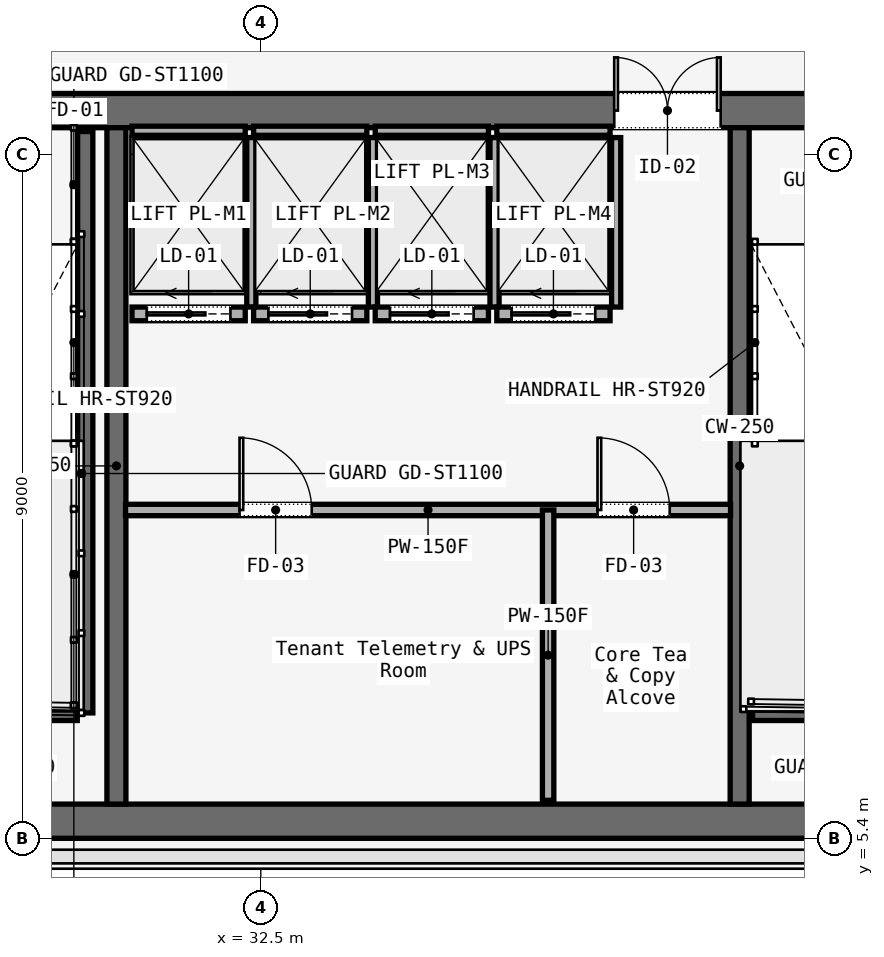
"""IFC4 building model, lengths in metres.
Left out: names, types, materials, properties, quantities, classifications, styles, units other than length and angle.
Written with IfcOpenShell. Run it as: python <this file> out.ifc"""

import sys

from ifc_helpers import new_model, si_unit, direction, frame, frame_2d, origin, place, context, subcontext, project, spatial, rectangle, extrude, element, fill, save


model = new_model("IFC4")
c1 = context("Model", 3, precision=1e-05, world=origin(), true_north=direction((0.0, 1.0)))
c2 = subcontext(c1, "Body", "Model", "MODEL_VIEW")
j1 = project(units=[si_unit("LENGTHUNIT", "METRE"), si_unit("PLANEANGLEUNIT", "RADIAN")], contexts=[c1])
p1 = place(None, origin())
s1 = spatial("IfcSite", under=j1, at=p1, CompositionType="ELEMENT")
p2 = place(p1, origin())
s2 = spatial("IfcBuilding", under=s1, at=p2, CompositionType="ELEMENT")
p3 = place(p2, frame((0.0, 0.0, 134.6)))
s3 = spatial("IfcBuildingStorey", under=s2, at=p3, CompositionType="ELEMENT", Elevation=134.6)
p4 = place(p3, frame((26.45, 14.975, 0.0), z_axis=(0.0, 0.0, 1.0), x_axis=(1.0, 0.0, 0.0)))
e1 = element("IfcWall", 1, at=p4, inside=s3, PredefinedType="SOLIDWALL", context=c2, shape_type="SweptSolid", body=[
    extrude(rectangle(XDim=31.1, YDim=0.45, at=frame_2d((15.55, 0.0))), origin(), (0.0, 0.0, 1.0), 3.58),
])
p5 = place(p4, frame((1.65, 0.0, 0.0)))
e2 = element("IfcOpeningElement", 2, at=p5, cuts=e1, PredefinedType="OPENING", context=c2, shape_type="SweptSolid", body=[
    extrude(rectangle(XDim=1.1, YDim=2.2, at=frame_2d((0.55, 1.1))), frame((0.0, 0.225, 0.0), z_axis=(0.0, -1.0, 0.0), x_axis=(1.0, 0.0, 0.0)), (0.0, 0.0, 1.0), 0.45),
])
p6 = place(p4, frame((13.65, 0.0, 0.0)))
e3 = element("IfcOpeningElement", 3, at=p6, cuts=e1, PredefinedType="OPENING", context=c2, shape_type="SweptSolid", body=[
    extrude(rectangle(XDim=1.1, YDim=2.2, at=frame_2d((0.55, 1.1))), frame((0.0, 0.225, 0.0), z_axis=(0.0, -1.0, 0.0), x_axis=(1.0, 0.0, 0.0)), (0.0, 0.0, 1.0), 0.45),
])
p7 = place(p4, frame((25.55, 0.0, 0.0)))
e4 = element("IfcOpeningElement", 4, at=p7, cuts=e1, PredefinedType="OPENING", context=c2, shape_type="SweptSolid", body=[
    extrude(rectangle(XDim=1.1, YDim=2.2, at=frame_2d((0.55, 1.1))), frame((0.0, 0.225, 0.0), z_axis=(0.0, -1.0, 0.0), x_axis=(1.0, 0.0, 0.0)), (0.0, 0.0, 1.0), 0.45),
])
p8 = place(p4, frame((10.7, 0.0, 0.0)))
e5 = element("IfcOpeningElement", 5, at=p8, cuts=e1, PredefinedType="OPENING", context=c2, shape_type="SweptSolid", body=[
    extrude(rectangle(XDim=1.4, YDim=2.2, at=frame_2d((0.7, 1.1))), frame((0.0, 0.225, 0.0), z_axis=(0.0, -1.0, 0.0), x_axis=(1.0, 0.0, 0.0)), (0.0, 0.0, 1.0), 0.45),
])
p9 = place(p4, frame((19.35, 0.0, 0.0)))
e6 = element("IfcOpeningElement", 6, at=p9, cuts=e1, PredefinedType="OPENING", context=c2, shape_type="SweptSolid", body=[
    extrude(rectangle(XDim=1.1, YDim=2.2, at=frame_2d((0.55, 1.1))), frame((0.0, 0.225, 0.0), z_axis=(0.0, -1.0, 0.0), x_axis=(1.0, 0.0, 0.0)), (0.0, 0.0, 1.0), 0.45),
])
p10 = place(p4, frame((21.4, 0.0, 0.0)))
e7 = element("IfcOpeningElement", 7, at=p10, cuts=e1, PredefinedType="OPENING", context=c2, shape_type="SweptSolid", body=[
    extrude(rectangle(XDim=0.9, YDim=2.1, at=frame_2d((0.45, 1.05))), frame((0.0, 0.225, 0.0), z_axis=(0.0, -1.0, 0.0), x_axis=(1.0, 0.0, 0.0)), (0.0, 0.0, 1.0), 0.45),
])
p11 = place(p4, frame((23.35, 0.0, 0.0)))
e8 = element("IfcOpeningElement", 8, at=p11, cuts=e1, PredefinedType="OPENING", context=c2, shape_type="SweptSolid", body=[
    extrude(rectangle(XDim=1.3, YDim=2.3, at=frame_2d((0.65, 1.15))), frame((0.0, 0.225, 0.0), z_axis=(0.0, -1.0, 0.0), x_axis=(1.0, 0.0, 0.0)), (0.0, 0.0, 1.0), 0.45),
])
p12 = place(p3, frame((26.45, 5.625, 0.0), z_axis=(0.0, 0.0, 1.0), x_axis=(1.0, 0.0, 0.0)))
e9 = element("IfcWall", 9, at=p12, inside=s3, PredefinedType="SOLIDWALL", context=c2, shape_type="SweptSolid", body=[
    extrude(rectangle(XDim=31.1, YDim=0.45, at=frame_2d((15.55, 0.0))), origin(), (0.0, 0.0, 1.0), 3.58),
])
for number, where, z_axis, x_axis in (
    (10, (30.6, 5.85, 0.0), (0.0, 0.0, 1.0), (0.0, 1.0, 0.0)),
    (11, (38.8, 5.85, 0.0), (0.0, 0.0, 1.0), (0.0, 1.0, 0.0)),
):
    element("IfcWall", number, at=place(p3, frame(where, z_axis=z_axis, x_axis=x_axis)), inside=s3, PredefinedType="SOLIDWALL", context=c2, shape_type="SweptSolid", body=[
        extrude(rectangle(XDim=8.9, YDim=0.25, at=frame_2d((4.45, 0.0))), origin(), (0.0, 0.0, 1.0), 3.58),
    ])
p13 = place(p3, frame((30.19, 14.7, 0.0), z_axis=(0.0, 0.0, 1.0), x_axis=(0.0, -1.0, 0.0)))
e12 = element("IfcWall", 12, at=p13, inside=s3, PredefinedType="SOLIDWALL", context=c2, shape_type="SweptSolid", body=[
    extrude(rectangle(XDim=7.65, YDim=0.2, at=frame_2d((3.825, 0.0))), origin(), (0.0, 0.0, 1.0), 3.8),
])
for number, where, z_axis, x_axis in (
    (13, (26.97, 7.05, 0.0), (0.0, 0.0, 1.0), (1.0, 0.0, 0.0)),
    (14, (38.97, 7.05, 0.0), (0.0, 0.0, 1.0), (1.0, 0.0, 0.0)),
):
    element("IfcWall", number, at=place(p3, frame(where, z_axis=z_axis, x_axis=x_axis)), inside=s3, PredefinedType="SOLIDWALL", context=c2, shape_type="SweptSolid", body=[
        extrude(rectangle(XDim=3.115, YDim=0.2, at=frame_2d((1.558, 0.0))), origin(), (0.0, 0.0, 1.0), 3.8),
    ])
p14 = place(p3, frame((30.72, 9.72, 0.0), z_axis=(0.0, 0.0, 1.0), x_axis=(1.0, 0.0, 0.0)))
e15 = element("IfcWall", 15, at=p14, inside=s3, PredefinedType="PARTITIONING", context=c2, shape_type="SweptSolid", body=[
    extrude(rectangle(XDim=7.96, YDim=0.15, at=frame_2d((3.98, 0.0))), origin(), (0.0, 0.0, 1.0), 3.01),
])
p15 = place(p14, frame((1.5, 0.0, 0.0)))
e16 = element("IfcOpeningElement", 16, at=p15, cuts=e15, PredefinedType="OPENING", context=c2, shape_type="SweptSolid", body=[
    extrude(rectangle(XDim=0.95, YDim=2.2, at=frame_2d((0.475, 1.1))), frame((0.0, 0.075, 0.0), z_axis=(0.0, -1.0, 0.0), x_axis=(1.0, 0.0, 0.0)), (0.0, 0.0, 1.0), 0.15),
])
p16 = place(p14, frame((6.21, 0.0, 0.0)))
e17 = element("IfcOpeningElement", 17, at=p16, cuts=e15, PredefinedType="OPENING", context=c2, shape_type="SweptSolid", body=[
    extrude(rectangle(XDim=0.95, YDim=2.2, at=frame_2d((0.475, 1.1))), frame((0.0, 0.075, 0.0), z_axis=(0.0, -1.0, 0.0), x_axis=(1.0, 0.0, 0.0)), (0.0, 0.0, 1.0), 0.15),
])
p17 = place(p3, frame((36.28, 5.9, 0.0), z_axis=(0.0, 0.0, 1.0), x_axis=(0.0, 1.0, 0.0)))
e18 = element("IfcWall", 18, at=p17, inside=s3, PredefinedType="PARTITIONING", context=c2, shape_type="SweptSolid", body=[
    extrude(rectangle(XDim=3.82, YDim=0.15, at=frame_2d((1.91, 0.0))), origin(), (0.0, 0.0, 1.0), 3.01),
])
p18 = place(p3, frame((30.805, 12.3, 0.0), z_axis=(0.0, 0.0, 1.0), x_axis=(1.0, 0.0, 0.0)))
e19 = element("IfcWall", 19, at=p18, inside=s3, PredefinedType="SOLIDWALL", context=c2, shape_type="SweptSolid", body=[
    extrude(rectangle(XDim=1.49, YDim=0.18, at=frame_2d((0.745, 0.0))), origin(), (0.0, 0.0, 1.0), 3.01),
])
p19 = place(p18, frame((0.195, 0.0, 0.0)))
e20 = element("IfcOpeningElement", 20, at=p19, cuts=e19, PredefinedType="OPENING", context=c2, shape_type="SweptSolid", body=[
    extrude(rectangle(XDim=1.1, YDim=2.2, at=frame_2d((0.55, 1.1))), frame((0.0, 0.09, 0.0), z_axis=(0.0, -1.0, 0.0), x_axis=(1.0, 0.0, 0.0)), (0.0, 0.0, 1.0), 0.18),
])
p20 = place(p3, frame((30.805, 14.71, 0.0), z_axis=(0.0, 0.0, 1.0), x_axis=(1.0, 0.0, 0.0)))
e21 = element("IfcWall", 21, at=p20, inside=s3, PredefinedType="SOLIDWALL", context=c2, shape_type="SweptSolid", body=[
    extrude(rectangle(XDim=1.49, YDim=0.12, at=frame_2d((0.745, 0.0))), origin(), (0.0, 0.0, 1.0), 3.01),
])
p21 = place(p3, frame((32.375, 12.39, 0.0), z_axis=(0.0, 0.0, 1.0), x_axis=(0.0, 1.0, 0.0)))
e22 = element("IfcWall", 22, at=p21, inside=s3, PredefinedType="SOLIDWALL", context=c2, shape_type="SweptSolid", body=[
    extrude(rectangle(XDim=2.23, YDim=0.12, at=frame_2d((1.115, 0.0))), origin(), (0.0, 0.0, 1.0), 3.01),
])
p22 = place(p3, frame((32.405, 12.3, 0.0), z_axis=(0.0, 0.0, 1.0), x_axis=(1.0, 0.0, 0.0)))
e23 = element("IfcWall", 23, at=p22, inside=s3, PredefinedType="SOLIDWALL", context=c2, shape_type="SweptSolid", body=[
    extrude(rectangle(XDim=1.49, YDim=0.18, at=frame_2d((0.745, 0.0))), origin(), (0.0, 0.0, 1.0), 3.01),
])
p23 = place(p22, frame((0.195, 0.0, 0.0)))
e24 = element("IfcOpeningElement", 24, at=p23, cuts=e23, PredefinedType="OPENING", context=c2, shape_type="SweptSolid", body=[
    extrude(rectangle(XDim=1.1, YDim=2.2, at=frame_2d((0.55, 1.1))), frame((0.0, 0.09, 0.0), z_axis=(0.0, -1.0, 0.0), x_axis=(1.0, 0.0, 0.0)), (0.0, 0.0, 1.0), 0.18),
])
p24 = place(p3, frame((32.405, 14.71, 0.0), z_axis=(0.0, 0.0, 1.0), x_axis=(1.0, 0.0, 0.0)))
e25 = element("IfcWall", 25, at=p24, inside=s3, PredefinedType="SOLIDWALL", context=c2, shape_type="SweptSolid", body=[
    extrude(rectangle(XDim=1.49, YDim=0.12, at=frame_2d((0.745, 0.0))), origin(), (0.0, 0.0, 1.0), 3.01),
])
p25 = place(p3, frame((33.975, 12.39, 0.0), z_axis=(0.0, 0.0, 1.0), x_axis=(0.0, 1.0, 0.0)))
e26 = element("IfcWall", 26, at=p25, inside=s3, PredefinedType="SOLIDWALL", context=c2, shape_type="SweptSolid", body=[
    extrude(rectangle(XDim=2.23, YDim=0.12, at=frame_2d((1.115, 0.0))), origin(), (0.0, 0.0, 1.0), 3.01),
])
p26 = place(p3, frame((34.005, 12.3, 0.0), z_axis=(0.0, 0.0, 1.0), x_axis=(1.0, 0.0, 0.0)))
e27 = element("IfcWall", 27, at=p26, inside=s3, PredefinedType="SOLIDWALL", context=c2, shape_type="SweptSolid", body=[
    extrude(rectangle(XDim=1.49, YDim=0.18, at=frame_2d((0.745, 0.0))), origin(), (0.0, 0.0, 1.0), 3.01),
])
p27 = place(p26, frame((0.195, 0.0, 0.0)))
e28 = element("IfcOpeningElement", 28, at=p27, cuts=e27, PredefinedType="OPENING", context=c2, shape_type="SweptSolid", body=[
    extrude(rectangle(XDim=1.1, YDim=2.2, at=frame_2d((0.55, 1.1))), frame((0.0, 0.09, 0.0), z_axis=(0.0, -1.0, 0.0), x_axis=(1.0, 0.0, 0.0)), (0.0, 0.0, 1.0), 0.18),
])
p28 = place(p3, frame((34.005, 14.71, 0.0), z_axis=(0.0, 0.0, 1.0), x_axis=(1.0, 0.0, 0.0)))
e29 = element("IfcWall", 29, at=p28, inside=s3, PredefinedType="SOLIDWALL", context=c2, shape_type="SweptSolid", body=[
    extrude(rectangle(XDim=1.49, YDim=0.12, at=frame_2d((0.745, 0.0))), origin(), (0.0, 0.0, 1.0), 3.01),
])
p29 = place(p3, frame((35.575, 12.39, 0.0), z_axis=(0.0, 0.0, 1.0), x_axis=(0.0, 1.0, 0.0)))
e30 = element("IfcWall", 30, at=p29, inside=s3, PredefinedType="SOLIDWALL", context=c2, shape_type="SweptSolid", body=[
    extrude(rectangle(XDim=2.23, YDim=0.12, at=frame_2d((1.115, 0.0))), origin(), (0.0, 0.0, 1.0), 3.01),
])
p30 = place(p3, frame((35.605, 12.3, 0.0), z_axis=(0.0, 0.0, 1.0), x_axis=(1.0, 0.0, 0.0)))
e31 = element("IfcWall", 31, at=p30, inside=s3, PredefinedType="SOLIDWALL", context=c2, shape_type="SweptSolid", body=[
    extrude(rectangle(XDim=1.49, YDim=0.18, at=frame_2d((0.745, 0.0))), origin(), (0.0, 0.0, 1.0), 3.01),
])
p31 = place(p30, frame((0.195, 0.0, 0.0)))
e32 = element("IfcOpeningElement", 32, at=p31, cuts=e31, PredefinedType="OPENING", context=c2, shape_type="SweptSolid", body=[
    extrude(rectangle(XDim=1.1, YDim=2.2, at=frame_2d((0.55, 1.1))), frame((0.0, 0.09, 0.0), z_axis=(0.0, -1.0, 0.0), x_axis=(1.0, 0.0, 0.0)), (0.0, 0.0, 1.0), 0.18),
])
p32 = place(p3, frame((35.605, 14.71, 0.0), z_axis=(0.0, 0.0, 1.0), x_axis=(1.0, 0.0, 0.0)))
e33 = element("IfcWall", 33, at=p32, inside=s3, PredefinedType="SOLIDWALL", context=c2, shape_type="SweptSolid", body=[
    extrude(rectangle(XDim=1.49, YDim=0.12, at=frame_2d((0.745, 0.0))), origin(), (0.0, 0.0, 1.0), 3.01),
])
p33 = place(p3, frame((37.175, 12.39, 0.0), z_axis=(0.0, 0.0, 1.0), x_axis=(0.0, 1.0, 0.0)))
e34 = element("IfcWall", 34, at=p33, inside=s3, PredefinedType="SOLIDWALL", context=c2, shape_type="SweptSolid", body=[
    extrude(rectangle(XDim=2.23, YDim=0.12, at=frame_2d((1.115, 0.0))), origin(), (0.0, 0.0, 1.0), 3.01),
])
p34 = place(p8, origin())
e35 = element("IfcDoor", 35, at=p34, inside=s3, OperationType="DOUBLE_DOOR_SINGLE_SWING", PredefinedType="DOOR", context=c2, shape_type="SweptSolid", body=[
    extrude(rectangle(XDim=1.4, YDim=2.2, at=frame_2d((0.7, 1.1))), frame((0.0, 0.025, 0.0), z_axis=(0.0, -1.0, 0.0), x_axis=(1.0, 0.0, 0.0)), (0.0, 0.0, 1.0), 0.05),
])
fill(e5, e35)
p35 = place(p15, origin())
e36 = element("IfcDoor", 36, at=p35, inside=s3, OperationType="SINGLE_SWING_LEFT", PredefinedType="DOOR", context=c2, shape_type="SweptSolid", body=[
    extrude(rectangle(XDim=0.95, YDim=2.2, at=frame_2d((0.475, 1.1))), frame((0.0, 0.025, 0.0), z_axis=(0.0, -1.0, 0.0), x_axis=(1.0, 0.0, 0.0)), (0.0, 0.0, 1.0), 0.05),
])
fill(e16, e36)
p36 = place(p16, origin())
e37 = element("IfcDoor", 37, at=p36, inside=s3, OperationType="SINGLE_SWING_RIGHT", PredefinedType="DOOR", context=c2, shape_type="SweptSolid", body=[
    extrude(rectangle(XDim=0.95, YDim=2.2, at=frame_2d((0.475, 1.1))), frame((0.0, 0.025, 0.0), z_axis=(0.0, -1.0, 0.0), x_axis=(1.0, 0.0, 0.0)), (0.0, 0.0, 1.0), 0.05),
])
fill(e17, e37)
p37 = place(p19, origin())
e38 = element("IfcDoor", 38, at=p37, inside=s3, OperationType="SLIDING_TO_LEFT", PredefinedType="DOOR", context=c2, shape_type="SweptSolid", body=[
    extrude(rectangle(XDim=1.1, YDim=2.2, at=frame_2d((0.55, 1.1))), frame((0.0, 0.025, 0.0), z_axis=(0.0, -1.0, 0.0), x_axis=(1.0, 0.0, 0.0)), (0.0, 0.0, 1.0), 0.05),
])
fill(e20, e38)
p38 = place(p23, origin())
e39 = element("IfcDoor", 39, at=p38, inside=s3, OperationType="SLIDING_TO_LEFT", PredefinedType="DOOR", context=c2, shape_type="SweptSolid", body=[
    extrude(rectangle(XDim=1.1, YDim=2.2, at=frame_2d((0.55, 1.1))), frame((0.0, 0.025, 0.0), z_axis=(0.0, -1.0, 0.0), x_axis=(1.0, 0.0, 0.0)), (0.0, 0.0, 1.0), 0.05),
])
fill(e24, e39)
p39 = place(p27, origin())
e40 = element("IfcDoor", 40, at=p39, inside=s3, OperationType="SLIDING_TO_LEFT", PredefinedType="DOOR", context=c2, shape_type="SweptSolid", body=[
    extrude(rectangle(XDim=1.1, YDim=2.2, at=frame_2d((0.55, 1.1))), frame((0.0, 0.025, 0.0), z_axis=(0.0, -1.0, 0.0), x_axis=(1.0, 0.0, 0.0)), (0.0, 0.0, 1.0), 0.05),
])
fill(e28, e40)
p40 = place(p31, origin())
e41 = element("IfcDoor", 41, at=p40, inside=s3, OperationType="SLIDING_TO_LEFT", PredefinedType="DOOR", context=c2, shape_type="SweptSolid", body=[
    extrude(rectangle(XDim=1.1, YDim=2.2, at=frame_2d((0.55, 1.1))), frame((0.0, 0.025, 0.0), z_axis=(0.0, -1.0, 0.0), x_axis=(1.0, 0.0, 0.0)), (0.0, 0.0, 1.0), 0.05),
])
fill(e32, e41)
save(model, sys.argv[1])
